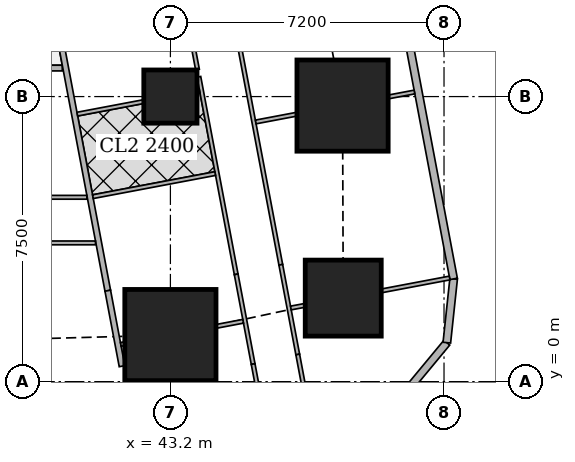
"""IFC4 building model, lengths in metres.
Left out: names, types, materials, properties, quantities, classifications, styles, units other than length and angle.
Written with IfcOpenShell. Run it as: python <this file> out.ifc"""

import sys

from ifc_helpers import new_model, si_unit, direction, frame, frame_2d, origin, origin_2d, place, context, subcontext, project, spatial, rectangle, extrude, element, fill, save


model = new_model("IFC4")
c1 = context("Model", 3, precision=1e-05, world=origin(), true_north=direction((0.0, 1.0)))
c2 = subcontext(c1, "Body", "Model", "MODEL_VIEW")
j1 = project(units=[si_unit("LENGTHUNIT", "METRE"), si_unit("PLANEANGLEUNIT", "RADIAN")], contexts=[c1])
p1 = place(None, origin())
s1 = spatial("IfcSite", under=j1, at=p1, CompositionType="ELEMENT")
p2 = place(p1, origin())
s2 = spatial("IfcBuilding", under=s1, at=p2, CompositionType="ELEMENT")
p3 = place(p2, frame((0.0, 0.0, 193.7)))
s3 = spatial("IfcBuildingStorey", under=s2, at=p3, CompositionType="ELEMENT", Elevation=193.7)
p4 = place(p3, frame((43.2, 1.225, 0.0), z_axis=(0.0, 0.0, 1.0), x_axis=(1.0, 0.0, 0.0)))
e1 = element("IfcColumn", 1, at=p4, inside=s3, PredefinedType="COLUMN", context=c2, shape_type="SweptSolid", body=[
    extrude(rectangle(XDim=2.4, YDim=2.4, at=origin_2d()), origin(), (0.0, 0.0, 1.0), 3.75),
])
p5 = place(p3, frame((47.748, 2.197, 0.0), z_axis=(0.0, 0.0, 1.0), x_axis=(1.0, 0.0, 0.0)))
e2 = element("IfcColumn", 2, at=p5, inside=s3, PredefinedType="COLUMN", context=c2, shape_type="SweptSolid", body=[
    extrude(rectangle(XDim=2.0, YDim=2.0, at=origin_2d()), origin(), (0.0, 0.0, 1.0), 3.75),
])
p6 = place(p3, frame((43.2, 7.5, 0.0), z_axis=(0.0, 0.0, 1.0), x_axis=(1.0, 0.0, 0.0)))
e3 = element("IfcColumn", 3, at=p6, inside=s3, PredefinedType="COLUMN", context=c2, shape_type="SweptSolid", body=[
    extrude(rectangle(XDim=1.4, YDim=1.4, at=origin_2d()), origin(), (0.0, 0.0, 1.0), 3.75),
])
p7 = place(p3, frame((47.73, 7.263, 0.0), z_axis=(0.0, 0.0, 1.0), x_axis=(1.0, 0.0, 0.0)))
e4 = element("IfcColumn", 4, at=p7, inside=s3, PredefinedType="COLUMN", context=c2, shape_type="SweptSolid", body=[
    extrude(rectangle(XDim=2.4, YDim=2.4, at=origin_2d()), origin(), (0.0, 0.0, 1.0), 3.75),
])
p8 = place(p3, frame((49.407, -0.263, 0.0), z_axis=(0.0, 0.0, 1.0), x_axis=(0.638042593423, 0.770001070764, 0.0)))
e5 = element("IfcWall", 5, at=p8, inside=s3, PredefinedType="SOLIDWALL", context=c2, shape_type="SweptSolid", body=[
    extrude(rectangle(XDim=1.673, YDim=0.2, at=frame_2d((0.836, 0.0))), origin(), (0.0, 0.0, 1.0), 3.5),
])
p9 = place(p3, frame((50.474, 1.025, 0.0), z_axis=(0.0, 0.0, 1.0), x_axis=(0.106047815515, 0.994361031429, 0.0)))
e6 = element("IfcWall", 6, at=p9, inside=s3, PredefinedType="SOLIDWALL", context=c2, shape_type="SweptSolid", body=[
    extrude(rectangle(XDim=1.688, YDim=0.2, at=frame_2d((0.844, 0.0))), origin(), (0.0, 0.0, 1.0), 3.5),
])
p10 = place(p3, frame((50.653, 2.703, 0.0), z_axis=(0.0, 0.0, 1.0), x_axis=(-0.185612026696, 0.982623109613, 0.0)))
e7 = element("IfcWall", 7, at=p10, inside=s3, PredefinedType="SOLIDWALL", context=c2, shape_type="SweptSolid", body=[
    extrude(rectangle(XDim=41.393, YDim=0.2, at=frame_2d((20.697, 0.0))), origin(), (0.0, 0.0, 1.0), 3.5),
])
p11 = place(p10, frame((1.633, 0.0, 0.9)))
e8 = element("IfcOpeningElement", 8, at=p11, cuts=e7, PredefinedType="OPENING", context=c2, shape_type="SweptSolid", body=[
    extrude(rectangle(XDim=1.8, YDim=1.5, at=frame_2d((0.9, 0.75))), frame((0.0, 0.11, 0.0), z_axis=(0.0, -1.0, 0.0), x_axis=(1.0, 0.0, 0.0)), (0.0, 0.0, 1.0), 0.22),
])
p12 = place(p10, frame((6.032, 0.0, 0.9)))
e9 = element("IfcOpeningElement", 9, at=p12, cuts=e7, PredefinedType="OPENING", context=c2, shape_type="SweptSolid", body=[
    extrude(rectangle(XDim=1.8, YDim=1.5, at=frame_2d((0.9, 0.75))), frame((0.0, 0.11, 0.0), z_axis=(0.0, -1.0, 0.0), x_axis=(1.0, 0.0, 0.0)), (0.0, 0.0, 1.0), 0.22),
])
p13 = place(p10, frame((9.848, 0.0, 0.9)))
e10 = element("IfcOpeningElement", 10, at=p13, cuts=e7, PredefinedType="OPENING", context=c2, shape_type="SweptSolid", body=[
    extrude(rectangle(XDim=1.8, YDim=1.5, at=frame_2d((0.9, 0.75))), frame((0.0, 0.11, 0.0), z_axis=(0.0, -1.0, 0.0), x_axis=(1.0, 0.0, 0.0)), (0.0, 0.0, 1.0), 0.22),
])
p14 = place(p10, frame((13.664, 0.0, 0.9)))
e11 = element("IfcOpeningElement", 11, at=p14, cuts=e7, PredefinedType="OPENING", context=c2, shape_type="SweptSolid", body=[
    extrude(rectangle(XDim=1.8, YDim=1.5, at=frame_2d((0.9, 0.75))), frame((0.0, 0.11, 0.0), z_axis=(0.0, -1.0, 0.0), x_axis=(1.0, 0.0, 0.0)), (0.0, 0.0, 1.0), 0.22),
])
p15 = place(p10, frame((17.481, 0.0, 0.9)))
e12 = element("IfcOpeningElement", 12, at=p15, cuts=e7, PredefinedType="OPENING", context=c2, shape_type="SweptSolid", body=[
    extrude(rectangle(XDim=1.8, YDim=1.5, at=frame_2d((0.9, 0.75))), frame((0.0, 0.11, 0.0), z_axis=(0.0, -1.0, 0.0), x_axis=(1.0, 0.0, 0.0)), (0.0, 0.0, 1.0), 0.22),
])
p16 = place(p10, frame((21.297, 0.0, 0.9)))
e13 = element("IfcOpeningElement", 13, at=p16, cuts=e7, PredefinedType="OPENING", context=c2, shape_type="SweptSolid", body=[
    extrude(rectangle(XDim=1.8, YDim=1.5, at=frame_2d((0.9, 0.75))), frame((0.0, 0.11, 0.0), z_axis=(0.0, -1.0, 0.0), x_axis=(1.0, 0.0, 0.0)), (0.0, 0.0, 1.0), 0.22),
])
p17 = place(p10, frame((25.113, 0.0, 0.9)))
e14 = element("IfcOpeningElement", 14, at=p17, cuts=e7, PredefinedType="OPENING", context=c2, shape_type="SweptSolid", body=[
    extrude(rectangle(XDim=1.8, YDim=1.5, at=frame_2d((0.9, 0.75))), frame((0.0, 0.11, 0.0), z_axis=(0.0, -1.0, 0.0), x_axis=(1.0, 0.0, 0.0)), (0.0, 0.0, 1.0), 0.22),
])
p18 = place(p10, frame((28.93, 0.0, 0.9)))
e15 = element("IfcOpeningElement", 15, at=p18, cuts=e7, PredefinedType="OPENING", context=c2, shape_type="SweptSolid", body=[
    extrude(rectangle(XDim=1.8, YDim=1.5, at=frame_2d((0.9, 0.75))), frame((0.0, 0.11, 0.0), z_axis=(0.0, -1.0, 0.0), x_axis=(1.0, 0.0, 0.0)), (0.0, 0.0, 1.0), 0.22),
])
p19 = place(p10, frame((32.746, 0.0, 0.9)))
e16 = element("IfcOpeningElement", 16, at=p19, cuts=e7, PredefinedType="OPENING", context=c2, shape_type="SweptSolid", body=[
    extrude(rectangle(XDim=1.8, YDim=1.5, at=frame_2d((0.9, 0.75))), frame((0.0, 0.11, 0.0), z_axis=(0.0, -1.0, 0.0), x_axis=(1.0, 0.0, 0.0)), (0.0, 0.0, 1.0), 0.22),
])
p20 = place(p10, frame((36.481, 0.0, 0.9)))
e17 = element("IfcOpeningElement", 17, at=p20, cuts=e7, PredefinedType="OPENING", context=c2, shape_type="SweptSolid", body=[
    extrude(rectangle(XDim=1.8, YDim=1.5, at=frame_2d((0.9, 0.75))), frame((0.0, 0.11, 0.0), z_axis=(0.0, -1.0, 0.0), x_axis=(1.0, 0.0, 0.0)), (0.0, 0.0, 1.0), 0.22),
])
p21 = place(p3, frame((40.355, 8.25, 0.0), z_axis=(0.0, 0.0, 1.0), x_axis=(-1.0, 0.0, 0.0)))
e18 = element("IfcWall", 18, at=p21, inside=s3, PredefinedType="SOLIDWALL", context=c2, shape_type="SweptSolid", body=[
    extrude(rectangle(XDim=3.654, YDim=0.15, at=frame_2d((1.827, 0.0))), origin(), (0.0, 0.0, 1.0), 3.5),
])
p22 = place(p3, frame((33.933, 42.73, 0.0), z_axis=(0.0, 0.0, 1.0), x_axis=(0.185595417643, -0.982626246825, 0.0)))
e19 = element("IfcWall", 19, at=p22, inside=s3, PredefinedType="SOLIDWALL", context=c2, shape_type="SweptSolid", body=[
    extrude(rectangle(XDim=41.051, YDim=0.15, at=frame_2d((20.525, 0.0))), origin(), (0.0, 0.0, 1.0), 2.5),
])
p23 = place(p22, frame((16.082, 0.0, 0.0)))
e20 = element("IfcOpeningElement", 20, at=p23, cuts=e19, PredefinedType="OPENING", context=c2, shape_type="SweptSolid", body=[
    extrude(rectangle(XDim=1.0, YDim=2.1, at=frame_2d((0.5, 1.05))), frame((0.0, 0.085, 0.0), z_axis=(0.0, -1.0, 0.0), x_axis=(1.0, 0.0, 0.0)), (0.0, 0.0, 1.0), 0.17),
])
p24 = place(p22, frame((19.898, 0.0, 0.0)))
e21 = element("IfcOpeningElement", 21, at=p24, cuts=e19, PredefinedType="OPENING", context=c2, shape_type="SweptSolid", body=[
    extrude(rectangle(XDim=1.0, YDim=2.1, at=frame_2d((0.5, 1.05))), frame((0.0, 0.085, 0.0), z_axis=(0.0, -1.0, 0.0), x_axis=(1.0, 0.0, 0.0)), (0.0, 0.0, 1.0), 0.17),
])
p25 = place(p22, frame((30.862, 0.0, 0.0)))
e22 = element("IfcOpeningElement", 22, at=p25, cuts=e19, PredefinedType="OPENING", context=c2, shape_type="SweptSolid", body=[
    extrude(rectangle(XDim=1.0, YDim=2.1, at=frame_2d((0.5, 1.05))), frame((0.0, 0.085, 0.0), z_axis=(0.0, -1.0, 0.0), x_axis=(1.0, 0.0, 0.0)), (0.0, 0.0, 1.0), 0.17),
])
p26 = place(p3, frame((41.552, 2.392, 0.0), z_axis=(0.0, 0.0, 1.0), x_axis=(0.185535500323, -0.982637561932, 0.0)))
e23 = element("IfcWall", 23, at=p26, inside=s3, PredefinedType="SOLIDWALL", context=c2, shape_type="SweptSolid", body=[
    extrude(rectangle(XDim=2.021, YDim=0.15, at=frame_2d((1.011, 0.0))), origin(), (0.0, 0.0, 1.0), 2.05),
])
p27 = place(p3, frame((41.229, 3.65, 0.0), z_axis=(0.0, 0.0, 1.0), x_axis=(-1.0, 0.0, 0.0)))
e24 = element("IfcWall", 24, at=p27, inside=s3, PredefinedType="PARTITIONING", context=c2, shape_type="SweptSolid", body=[
    extrude(rectangle(XDim=8.829, YDim=0.1, at=frame_2d((4.415, 0.0))), origin(), (0.0, 0.0, 1.0), 3.5),
])
p28 = place(p27, frame((7.729, 0.0, 0.0)))
e25 = element("IfcOpeningElement", 25, at=p28, cuts=e24, PredefinedType="OPENING", context=c2, shape_type="SweptSolid", body=[
    extrude(rectangle(XDim=0.9, YDim=2.1, at=frame_2d((0.45, 1.05))), frame((0.0, 0.06, 0.0), z_axis=(0.0, -1.0, 0.0), x_axis=(1.0, 0.0, 0.0)), (0.0, 0.0, 1.0), 0.12),
])
p29 = place(p27, frame((4.129, 0.0, 0.0)))
e26 = element("IfcOpeningElement", 26, at=p29, cuts=e24, PredefinedType="OPENING", context=c2, shape_type="SweptSolid", body=[
    extrude(rectangle(XDim=0.9, YDim=2.1, at=frame_2d((0.45, 1.05))), frame((0.0, 0.06, 0.0), z_axis=(0.0, -1.0, 0.0), x_axis=(1.0, 0.0, 0.0)), (0.0, 0.0, 1.0), 0.12),
])
p30 = place(p3, frame((41.002, 4.85, 0.0), z_axis=(0.0, 0.0, 1.0), x_axis=(-1.0, 0.0, 0.0)))
e27 = element("IfcWall", 27, at=p30, inside=s3, PredefinedType="PARTITIONING", context=c2, shape_type="SweptSolid", body=[
    extrude(rectangle(XDim=8.602, YDim=0.1, at=frame_2d((4.301, 0.0))), origin(), (0.0, 0.0, 1.0), 3.5),
])
p31 = place(p30, frame((7.047, 0.0, 0.0)))
e28 = element("IfcOpeningElement", 28, at=p31, cuts=e27, PredefinedType="OPENING", context=c2, shape_type="SweptSolid", body=[
    extrude(rectangle(XDim=0.9, YDim=2.1, at=frame_2d((0.45, 1.05))), frame((0.0, 0.06, 0.0), z_axis=(0.0, -1.0, 0.0), x_axis=(1.0, 0.0, 0.0)), (0.0, 0.0, 1.0), 0.12),
])
p32 = place(p30, frame((3.752, 0.0, 0.0)))
e29 = element("IfcOpeningElement", 29, at=p32, cuts=e27, PredefinedType="OPENING", context=c2, shape_type="SweptSolid", body=[
    extrude(rectangle(XDim=0.9, YDim=2.1, at=frame_2d((0.45, 1.05))), frame((0.0, 0.06, 0.0), z_axis=(0.0, -1.0, 0.0), x_axis=(1.0, 0.0, 0.0)), (0.0, 0.0, 1.0), 0.12),
])
p33 = place(p30, frame((0.15, 0.0, 0.0)))
e30 = element("IfcOpeningElement", 30, at=p33, cuts=e27, PredefinedType="OPENING", context=c2, shape_type="SweptSolid", body=[
    extrude(rectangle(XDim=0.9, YDim=2.1, at=frame_2d((0.45, 1.05))), frame((0.0, 0.06, 0.0), z_axis=(0.0, -1.0, 0.0), x_axis=(1.0, 0.0, 0.0)), (0.0, 0.0, 1.0), 0.12),
])
p34 = place(p30, frame((5.247, 0.0, 0.0)))
e31 = element("IfcOpeningElement", 31, at=p34, cuts=e27, PredefinedType="OPENING", context=c2, shape_type="SweptSolid", body=[
    extrude(rectangle(XDim=0.9, YDim=2.1, at=frame_2d((0.45, 1.05))), frame((0.0, 0.06, 0.0), z_axis=(0.0, -1.0, 0.0), x_axis=(1.0, 0.0, 0.0)), (0.0, 0.0, 1.0), 0.12),
])
p35 = place(p30, frame((1.952, 0.0, 0.0)))
e32 = element("IfcOpeningElement", 32, at=p35, cuts=e27, PredefinedType="OPENING", context=c2, shape_type="SweptSolid", body=[
    extrude(rectangle(XDim=0.9, YDim=2.1, at=frame_2d((0.45, 1.05))), frame((0.0, 0.06, 0.0), z_axis=(0.0, -1.0, 0.0), x_axis=(1.0, 0.0, 0.0)), (0.0, 0.0, 1.0), 0.12),
])
p36 = place(p3, frame((44.727, 10.366, 0.0), z_axis=(0.0, 0.0, 1.0), x_axis=(0.185678775129, -0.982610498858, 0.0)))
e33 = element("IfcWall", 33, at=p36, inside=s3, PredefinedType="PARTITIONING", context=c2, shape_type="SweptSolid", body=[
    extrude(rectangle(XDim=7.421, YDim=0.1, at=frame_2d((3.71, 0.0))), origin(), (0.0, 0.0, 1.0), 3.5),
])
p37 = place(p36, frame((0.151, 0.0, 0.0)))
e34 = element("IfcOpeningElement", 34, at=p37, cuts=e33, PredefinedType="OPENING", context=c2, shape_type="SweptSolid", body=[
    extrude(rectangle(XDim=0.9, YDim=2.1, at=frame_2d((0.45, 1.05))), frame((0.0, 0.06, 0.0), z_axis=(0.0, -1.0, 0.0), x_axis=(1.0, 0.0, 0.0)), (0.0, 0.0, 1.0), 0.12),
])
p38 = place(p36, frame((4.65, 0.0, 0.0)))
e35 = element("IfcOpeningElement", 35, at=p38, cuts=e33, PredefinedType="OPENING", context=c2, shape_type="SweptSolid", body=[
    extrude(rectangle(XDim=0.9, YDim=2.1, at=frame_2d((0.45, 1.05))), frame((0.0, 0.06, 0.0), z_axis=(0.0, -1.0, 0.0), x_axis=(1.0, 0.0, 0.0)), (0.0, 0.0, 1.0), 0.12),
])
p39 = place(p3, frame((46.105, 3.074, 0.0), z_axis=(0.0, 0.0, 1.0), x_axis=(0.185631845838, -0.982619365681, 0.0)))
e36 = element("IfcWall", 36, at=p39, inside=s3, PredefinedType="PARTITIONING", context=c2, shape_type="SweptSolid", body=[
    extrude(rectangle(XDim=2.403, YDim=0.1, at=frame_2d((1.201, 0.0))), origin(), (0.0, 0.0, 1.0), 2.05),
])
p40 = place(p3, frame((46.551, 0.713, 0.0), z_axis=(0.0, 0.0, 1.0), x_axis=(0.185407859198, -0.982661653748, 0.0)))
e37 = element("IfcWall", 37, at=p40, inside=s3, PredefinedType="PARTITIONING", context=c2, shape_type="SweptSolid", body=[
    extrude(rectangle(XDim=1.343, YDim=0.1, at=frame_2d((0.671, 0.0))), origin(), (0.0, 0.0, 1.0), 3.5),
])
p41 = place(p3, frame((43.539, 10.192, 0.0), z_axis=(0.0, 0.0, 1.0), x_axis=(0.185443145218, -0.982654995353, 0.0)))
e38 = element("IfcWall", 38, at=p41, inside=s3, PredefinedType="PARTITIONING", context=c2, shape_type="SweptSolid", body=[
    extrude(rectangle(XDim=2.017, YDim=0.1, at=frame_2d((1.008, 0.0))), origin(), (0.0, 0.0, 1.0), 3.5),
])
p42 = place(p3, frame((43.949, 8.02, 0.0), z_axis=(0.0, 0.0, 1.0), x_axis=(0.185656792073, -0.982614652627, 0.0)))
e39 = element("IfcWall", 39, at=p42, inside=s3, PredefinedType="PARTITIONING", context=c2, shape_type="SweptSolid", body=[
    extrude(rectangle(XDim=5.289, YDim=0.1, at=frame_2d((2.645, 0.0))), origin(), (0.0, 0.0, 1.0), 3.5),
])
p43 = place(p42, frame((1.2, 0.0, 0.0)))
e40 = element("IfcOpeningElement", 40, at=p43, cuts=e39, PredefinedType="OPENING", context=c2, shape_type="SweptSolid", body=[
    extrude(rectangle(XDim=0.9, YDim=2.1, at=frame_2d((0.45, 1.05))), frame((0.0, 0.06, 0.0), z_axis=(0.0, -1.0, 0.0), x_axis=(1.0, 0.0, 0.0)), (0.0, 0.0, 1.0), 0.12),
])
p44 = place(p42, frame((2.935, 0.0, 0.0)))
e41 = element("IfcOpeningElement", 41, at=p44, cuts=e39, PredefinedType="OPENING", context=c2, shape_type="SweptSolid", body=[
    extrude(rectangle(XDim=0.9, YDim=2.1, at=frame_2d((0.45, 1.05))), frame((0.0, 0.06, 0.0), z_axis=(0.0, -1.0, 0.0), x_axis=(1.0, 0.0, 0.0)), (0.0, 0.0, 1.0), 0.12),
])
p45 = place(p3, frame((44.931, 2.823, 0.0), z_axis=(0.0, 0.0, 1.0), x_axis=(0.185631845838, -0.982619365681, 0.0)))
e42 = element("IfcWall", 42, at=p45, inside=s3, PredefinedType="PARTITIONING", context=c2, shape_type="SweptSolid", body=[
    extrude(rectangle(XDim=2.403, YDim=0.1, at=frame_2d((1.201, 0.0))), origin(), (0.0, 0.0, 1.0), 2.05),
])
p46 = place(p3, frame((45.377, 0.462, 0.0), z_axis=(0.0, 0.0, 1.0), x_axis=(0.185513480919, -0.982641719243, 0.0)))
e43 = element("IfcWall", 43, at=p46, inside=s3, PredefinedType="PARTITIONING", context=c2, shape_type="SweptSolid", body=[
    extrude(rectangle(XDim=1.095, YDim=0.1, at=frame_2d((0.547, 0.0))), origin(), (0.0, 0.0, 1.0), 3.5),
])
p47 = place(p3, frame((49.622, 7.62, 0.0), z_axis=(0.0, 0.0, 1.0), x_axis=(-0.98254419619, -0.186029305578, 0.0)))
e44 = element("IfcWall", 44, at=p47, inside=s3, PredefinedType="PARTITIONING", context=c2, shape_type="SweptSolid", body=[
    extrude(rectangle(XDim=0.694, YDim=0.1, at=frame_2d((0.347, 0.0))), origin(), (0.0, 0.0, 1.0), 3.5),
])
p48 = place(p3, frame((46.52, 7.035, 0.0), z_axis=(0.0, 0.0, 1.0), x_axis=(-0.982620932907, -0.185623549726, 0.0)))
e45 = element("IfcWall", 45, at=p48, inside=s3, PredefinedType="PARTITIONING", context=c2, shape_type="SweptSolid", body=[
    extrude(rectangle(XDim=1.093, YDim=0.1, at=frame_2d((0.546, 0.0))), origin(), (0.0, 0.0, 1.0), 3.5),
])
p49 = place(p3, frame((50.547, 2.726, 0.0), z_axis=(0.0, 0.0, 1.0), x_axis=(-0.982603988143, -0.185713226471, 0.0)))
e46 = element("IfcWall", 46, at=p49, inside=s3, PredefinedType="PARTITIONING", context=c2, shape_type="SweptSolid", body=[
    extrude(rectangle(XDim=1.821, YDim=0.1, at=frame_2d((0.91, 0.0))), origin(), (0.0, 0.0, 1.0), 2.05),
])
p50 = place(p3, frame((46.738, 2.006, 0.0), z_axis=(0.0, 0.0, 1.0), x_axis=(-0.982820466874, -0.184564161994, 0.0)))
e47 = element("IfcWall", 47, at=p50, inside=s3, PredefinedType="PARTITIONING", context=c2, shape_type="SweptSolid", body=[
    extrude(rectangle(XDim=0.374, YDim=0.1, at=frame_2d((0.187, 0.0))), origin(), (0.0, 0.0, 1.0), 2.05),
])
p51 = place(p3, frame((43.969, 7.646, 0.0), z_axis=(0.0, 0.0, 1.0), x_axis=(-0.983147034646, -0.182816597351, 0.0)))
e48 = element("IfcWall", 48, at=p51, inside=s3, PredefinedType="PARTITIONING", context=c2, shape_type="SweptSolid", body=[
    extrude(rectangle(XDim=0.06, YDim=0.1, at=frame_2d((0.03, 0.0))), origin(), (0.0, 0.0, 1.0), 3.5),
])
p52 = place(p3, frame((42.49, 7.367, 0.0), z_axis=(0.0, 0.0, 1.0), x_axis=(-0.982585223885, -0.185812480215, 0.0)))
e49 = element("IfcWall", 49, at=p52, inside=s3, PredefinedType="PARTITIONING", context=c2, shape_type="SweptSolid", body=[
    extrude(rectangle(XDim=1.77, YDim=0.1, at=frame_2d((0.885, 0.0))), origin(), (0.0, 0.0, 1.0), 3.5),
])
p53 = place(p3, frame((45.114, 1.587, 0.0), z_axis=(0.0, 0.0, 1.0), x_axis=(-0.982671022916, -0.185358195723, 0.0)))
e50 = element("IfcWall", 50, at=p53, inside=s3, PredefinedType="PARTITIONING", context=c2, shape_type="SweptSolid", body=[
    extrude(rectangle(XDim=0.717, YDim=0.1, at=frame_2d((0.358, 0.0))), origin(), (0.0, 0.0, 1.0), 2.05),
])
p54 = place(p3, frame((41.99, 0.997, 0.0), z_axis=(0.0, 0.0, 1.0), x_axis=(-0.982382747416, -0.186880008506, 0.0)))
e51 = element("IfcWall", 51, at=p54, inside=s3, PredefinedType="PARTITIONING", context=c2, shape_type="SweptSolid", body=[
    extrude(rectangle(XDim=0.097, YDim=0.1, at=frame_2d((0.048, 0.0))), origin(), (0.0, 0.0, 1.0), 2.05),
])
p55 = place(p3, frame((44.379, 5.474, 0.0), z_axis=(0.0, 0.0, 1.0), x_axis=(-0.982607026909, -0.185697147715, 0.0)))
e52 = element("IfcWall", 52, at=p55, inside=s3, PredefinedType="PARTITIONING", context=c2, shape_type="SweptSolid", body=[
    extrude(rectangle(XDim=3.275, YDim=0.1, at=frame_2d((1.637, 0.0))), origin(), (0.0, 0.0, 1.0), 3.5),
])
p56 = place(p11, origin())
e53 = element("IfcWindow", 53, at=p56, inside=s3, PartitioningType="SINGLE_PANEL", PredefinedType="WINDOW", context=c2, shape_type="SweptSolid", body=[
    extrude(rectangle(XDim=1.8, YDim=1.5, at=frame_2d((0.9, 0.75))), frame((0.0, 0.03, 0.0), z_axis=(0.0, -1.0, 0.0), x_axis=(1.0, 0.0, 0.0)), (0.0, 0.0, 1.0), 0.06),
])
fill(e8, e53)
p57 = place(p12, origin())
e54 = element("IfcWindow", 54, at=p57, inside=s3, PartitioningType="SINGLE_PANEL", PredefinedType="WINDOW", context=c2, shape_type="SweptSolid", body=[
    extrude(rectangle(XDim=1.8, YDim=1.5, at=frame_2d((0.9, 0.75))), frame((0.0, 0.03, 0.0), z_axis=(0.0, -1.0, 0.0), x_axis=(1.0, 0.0, 0.0)), (0.0, 0.0, 1.0), 0.06),
])
fill(e9, e54)
p58 = place(p33, origin())
e55 = element("IfcDoor", 55, at=p58, inside=s3, OperationType="SINGLE_SWING_RIGHT", PredefinedType="DOOR", context=c2, shape_type="SweptSolid", body=[
    extrude(rectangle(XDim=0.9, YDim=2.1, at=frame_2d((0.45, 1.05))), frame((0.0, 0.025, 0.0), z_axis=(0.0, -1.0, 0.0), x_axis=(1.0, 0.0, 0.0)), (0.0, 0.0, 1.0), 0.05),
])
fill(e30, e55)
p59 = place(p38, origin())
e56 = element("IfcDoor", 56, at=p59, inside=s3, OperationType="SINGLE_SWING_LEFT", PredefinedType="DOOR", context=c2, shape_type="SweptSolid", body=[
    extrude(rectangle(XDim=0.9, YDim=2.1, at=frame_2d((0.45, 1.05))), frame((0.0, 0.025, 0.0), z_axis=(0.0, -1.0, 0.0), x_axis=(1.0, 0.0, 0.0)), (0.0, 0.0, 1.0), 0.05),
])
fill(e35, e56)
p60 = place(p43, origin())
e57 = element("IfcDoor", 57, at=p60, inside=s3, OperationType="SINGLE_SWING_LEFT", PredefinedType="DOOR", context=c2, shape_type="SweptSolid", body=[
    extrude(rectangle(XDim=0.9, YDim=2.1, at=frame_2d((0.45, 1.05))), frame((0.0, 0.025, 0.0), z_axis=(0.0, -1.0, 0.0), x_axis=(1.0, 0.0, 0.0)), (0.0, 0.0, 1.0), 0.05),
])
fill(e40, e57)
p61 = place(p44, origin())
e58 = element("IfcDoor", 58, at=p61, inside=s3, OperationType="SINGLE_SWING_RIGHT", PredefinedType="DOOR", context=c2, shape_type="SweptSolid", body=[
    extrude(rectangle(XDim=0.9, YDim=2.1, at=frame_2d((0.45, 1.05))), frame((0.0, 0.025, 0.0), z_axis=(0.0, -1.0, 0.0), x_axis=(1.0, 0.0, 0.0)), (0.0, 0.0, 1.0), 0.05),
])
fill(e41, e58)
save(model, sys.argv[1])
